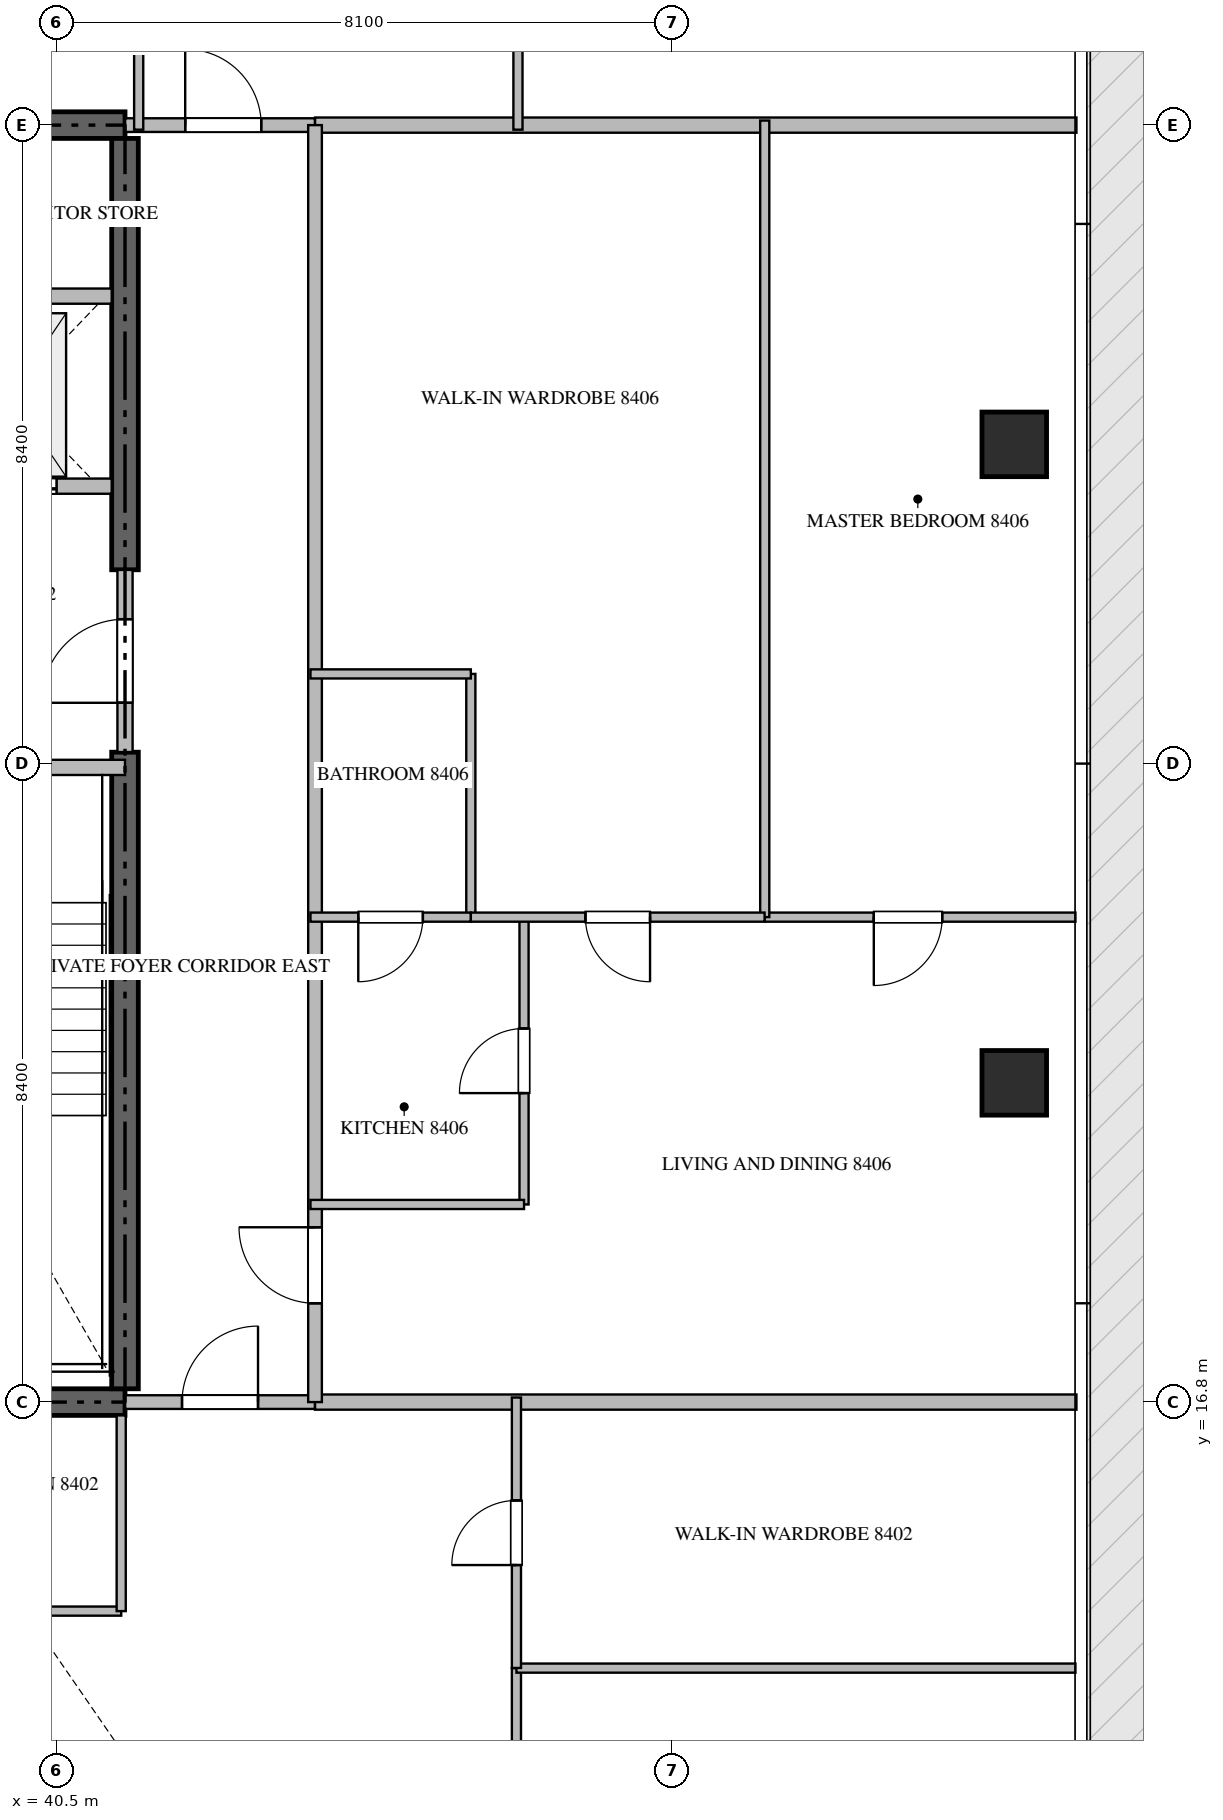
"""IFC4 building model, lengths in metres.
Left out: names, types, materials, properties, quantities, classifications, styles, units other than length and angle.
Written with IfcOpenShell. Run it as: python <this file> out.ifc"""

import sys

from ifc_helpers import new_model, si_unit, direction, frame, frame_2d, origin, origin_2d, place, context, subcontext, project, spatial, rectangle, extrude, source, transform, mapped, element, fill, save


model = new_model("IFC4")
c1 = context("Model", 3, precision=1e-05, world=origin(), true_north=direction((0.0, 1.0)))
c2 = subcontext(c1, "Body", "Model", "MODEL_VIEW")
j1 = project(units=[si_unit("LENGTHUNIT", "METRE"), si_unit("PLANEANGLEUNIT", "RADIAN")], contexts=[c1])
p1 = place(None, origin())
s1 = spatial("IfcSite", under=j1, at=p1, CompositionType="ELEMENT")
p2 = place(p1, origin())
s2 = spatial("IfcBuilding", under=s1, at=p2, CompositionType="ELEMENT")
p3 = place(p2, frame((0.0, 0.0, 338.0)))
s3 = spatial("IfcBuildingStorey", under=s2, at=p3, CompositionType="ELEMENT", Elevation=338.0)
for number, where, z_axis, x_axis in (
    (1, (23.4, 16.8, -0.44), (0.0, 0.0, 1.0), (1.0, 0.0, 0.0)),
    (2, (41.4, 33.6, -0.44), (0.0, 0.0, 1.0), (-1.0, 0.0, 0.0)),
):
    element("IfcWall", number, at=place(p3, frame(where, z_axis=z_axis, x_axis=x_axis)), inside=s3, PredefinedType="SHEAR", context=c2, shape_type="SweptSolid", body=[
        extrude(rectangle(XDim=18.0, YDim=0.35, at=frame_2d((9.0, 0.0))), origin(), (0.0, 0.0, 1.0), 4.228),
    ])
p4 = place(p3, frame((41.4, 16.975, -0.44), z_axis=(0.0, 0.0, 1.0), x_axis=(0.0, 1.0, 0.0)))
e3 = element("IfcWall", 3, at=p4, inside=s3, PredefinedType="SHEAR", context=c2, shape_type="SweptSolid", body=[
    extrude(rectangle(XDim=8.375, YDim=0.35, at=frame_2d((4.188, 0.0))), origin(), (0.0, 0.0, 1.0), 4.228),
])
p5 = place(p3, frame((41.4, 27.75, -0.44), z_axis=(0.0, 0.0, 1.0), x_axis=(0.0, 1.0, 0.0)))
e4 = element("IfcWall", 4, at=p5, inside=s3, PredefinedType="SHEAR", context=c2, shape_type="SweptSolid", body=[
    extrude(rectangle(XDim=5.675, YDim=0.35, at=frame_2d((2.837, 0.0))), origin(), (0.0, 0.0, 1.0), 4.228),
])
m1 = source(origin(), c2, "Body", "SweptSolid", [
    extrude(rectangle(XDim=0.85, YDim=0.85, at=origin_2d()), origin(), (0.0, 0.0, 1.0), 4.23),
])
for number, where, z_axis, x_axis in (
    (5, (53.1, 21.0, -0.44), (0.0, 0.0, 1.0), (1.0, 0.0, 0.0)),
    (6, (53.1, 29.4, -0.44), (0.0, 0.0, 1.0), (1.0, 0.0, 0.0)),
):
    element("IfcColumn", number, at=place(p3, frame(where, z_axis=z_axis, x_axis=x_axis)), inside=s3, PredefinedType="COLUMN", context=c2, shape_type="MappedRepresentation", body=[
        mapped(m1, transform((0.0, 0.0, 0.0), scale=1.0)),
    ])
p6 = place(p3, frame((36.95, 25.15, 0.0), z_axis=(0.0, 0.0, 1.0), x_axis=(1.0, 0.0, 0.0)))
e7 = element("IfcWall", 7, at=p6, inside=s3, PredefinedType="STANDARD", context=c2, shape_type="SweptSolid", body=[
    extrude(rectangle(XDim=4.45, YDim=0.2, at=frame_2d((2.225, 0.0))), origin(), (0.0, 0.0, 1.0), 3.79),
])
p7 = place(p6, frame((1.65, 0.0, 0.0)))
e8 = element("IfcOpeningElement", 8, at=p7, cuts=e7, PredefinedType="OPENING", context=c2, shape_type="SweptSolid", body=[
    extrude(rectangle(XDim=1.1, YDim=2.15, at=frame_2d((0.55, 1.075))), frame((0.0, 0.11, 0.0), z_axis=(0.0, -1.0, 0.0), x_axis=(1.0, 0.0, 0.0)), (0.0, 0.0, 1.0), 0.22),
])
p8 = place(p3, frame((38.75, 28.85, 0.0), z_axis=(0.0, 0.0, 1.0), x_axis=(1.0, 0.0, 0.0)))
e9 = element("IfcWall", 9, at=p8, inside=s3, PredefinedType="STANDARD", context=c2, shape_type="SweptSolid", body=[
    extrude(rectangle(XDim=2.475, YDim=0.2, at=frame_2d((1.238, 0.0))), origin(), (0.0, 0.0, 1.0), 3.79),
])
p9 = place(p8, frame((0.55, 0.0, 0.0)))
e10 = element("IfcOpeningElement", 10, at=p9, cuts=e9, PredefinedType="OPENING", context=c2, shape_type="SweptSolid", body=[
    extrude(rectangle(XDim=1.2, YDim=2.2, at=frame_2d((0.6, 1.1))), frame((0.0, 0.11, 0.0), z_axis=(0.0, -1.0, 0.0), x_axis=(1.0, 0.0, 0.0)), (0.0, 0.0, 1.0), 0.22),
])
p10 = place(p3, frame((38.75, 31.35, 0.0), z_axis=(0.0, 0.0, 1.0), x_axis=(1.0, 0.0, 0.0)))
e11 = element("IfcWall", 11, at=p10, inside=s3, PredefinedType="STANDARD", context=c2, shape_type="SweptSolid", body=[
    extrude(rectangle(XDim=2.475, YDim=0.2, at=frame_2d((1.238, 0.0))), origin(), (0.0, 0.0, 1.0), 3.79),
])
p11 = place(p3, frame((41.4, 25.352, 0.0), z_axis=(0.0, 0.0, 1.0), x_axis=(0.0, 1.0, 0.0)))
e12 = element("IfcWall", 12, at=p11, inside=s3, PredefinedType="STANDARD", context=c2, shape_type="SweptSolid", body=[
    extrude(rectangle(XDim=2.396, YDim=0.2, at=frame_2d((1.198, 0.0))), origin(), (0.0, 0.0, 1.0), 3.79),
])
p12 = place(p11, frame((0.648, 0.0, 0.0)))
e13 = element("IfcOpeningElement", 13, at=p12, cuts=e12, PredefinedType="OPENING", context=c2, shape_type="SweptSolid", body=[
    extrude(rectangle(XDim=1.1, YDim=2.15, at=frame_2d((0.55, 1.075))), frame((0.0, 0.11, 0.0), z_axis=(0.0, -1.0, 0.0), x_axis=(1.0, 0.0, 0.0)), (0.0, 0.0, 1.0), 0.22),
])
for number, where, z_axis, x_axis in (
    (14, (43.9, 16.8, 0.0), (0.0, 0.0, 1.0), (1.0, 0.0, 0.0)),
    (15, (43.9, 33.6, 0.0), (0.0, 0.0, 1.0), (1.0, 0.0, 0.0)),
):
    element("IfcWall", number, at=place(p3, frame(where, z_axis=z_axis, x_axis=x_axis)), inside=s3, PredefinedType="PARTITIONING", context=c2, shape_type="SweptSolid", body=[
        extrude(rectangle(XDim=10.018, YDim=0.2, at=frame_2d((5.009, 0.0))), origin(), (0.0, 0.0, 1.0), 3.79),
    ])
p13 = place(p3, frame((41.402, 16.8, 0.0), z_axis=(0.0, 0.0, 1.0), x_axis=(1.0, 0.0, 0.0)))
e16 = element("IfcWall", 16, at=p13, inside=s3, PredefinedType="PARTITIONING", context=c2, shape_type="SweptSolid", body=[
    extrude(rectangle(XDim=2.496, YDim=0.18, at=frame_2d((1.248, 0.0))), origin(), (0.0, 0.0, 1.0), 3.79),
])
p14 = place(p13, frame((0.748, 0.0, 0.0)))
e17 = element("IfcOpeningElement", 17, at=p14, cuts=e16, PredefinedType="OPENING", context=c2, shape_type="SweptSolid", body=[
    extrude(rectangle(XDim=1.0, YDim=2.15, at=frame_2d((0.5, 1.075))), frame((0.0, 0.1, 0.0), z_axis=(0.0, -1.0, 0.0), x_axis=(1.0, 0.0, 0.0)), (0.0, 0.0, 1.0), 0.2),
])
p15 = place(p3, frame((41.402, 33.6, 0.0), z_axis=(0.0, 0.0, 1.0), x_axis=(1.0, 0.0, 0.0)))
e18 = element("IfcWall", 18, at=p15, inside=s3, PredefinedType="PARTITIONING", context=c2, shape_type="SweptSolid", body=[
    extrude(rectangle(XDim=2.496, YDim=0.18, at=frame_2d((1.248, 0.0))), origin(), (0.0, 0.0, 1.0), 3.79),
])
p16 = place(p15, frame((0.79, 0.0, 0.0)))
e19 = element("IfcOpeningElement", 19, at=p16, cuts=e18, PredefinedType="OPENING", context=c2, shape_type="SweptSolid", body=[
    extrude(rectangle(XDim=1.0, YDim=2.15, at=frame_2d((0.5, 1.075))), frame((0.0, 0.1, 0.0), z_axis=(0.0, -1.0, 0.0), x_axis=(1.0, 0.0, 0.0)), (0.0, 0.0, 1.0), 0.2),
])
p17 = place(p3, frame((43.9, 16.8, 0.0), z_axis=(0.0, 0.0, 1.0), x_axis=(0.0, 1.0, 0.0)))
e20 = element("IfcWall", 20, at=p17, inside=s3, PredefinedType="PARTITIONING", context=c2, shape_type="SweptSolid", body=[
    extrude(rectangle(XDim=16.8, YDim=0.18, at=frame_2d((8.4, 0.0))), origin(), (0.0, 0.0, 1.0), 3.79),
])
p18 = place(p17, frame((1.3, 0.0, 0.0)))
e21 = element("IfcOpeningElement", 21, at=p18, cuts=e20, PredefinedType="OPENING", context=c2, shape_type="SweptSolid", body=[
    extrude(rectangle(XDim=1.0, YDim=2.15, at=frame_2d((0.5, 1.075))), frame((0.0, 0.1, 0.0), z_axis=(0.0, -1.0, 0.0), x_axis=(1.0, 0.0, 0.0)), (0.0, 0.0, 1.0), 0.2),
])
p19 = place(p3, frame((38.5, 14.05, 0.0), z_axis=(0.0, 0.0, 1.0), x_axis=(1.0, 0.0, 0.0)))
e22 = element("IfcWall", 22, at=p19, inside=s3, PredefinedType="PARTITIONING", context=c2, shape_type="SweptSolid", body=[
    extrude(rectangle(XDim=2.85, YDim=0.12, at=frame_2d((1.425, 0.0))), origin(), (0.0, 0.0, 1.0), 3.79),
])
p20 = place(p19, frame((1.0, 0.0, 0.0)))
e23 = element("IfcOpeningElement", 23, at=p20, cuts=e22, PredefinedType="OPENING", context=c2, shape_type="SweptSolid", body=[
    extrude(rectangle(XDim=0.85, YDim=2.1, at=frame_2d((0.425, 1.05))), frame((0.0, 0.07, 0.0), z_axis=(0.0, -1.0, 0.0), x_axis=(1.0, 0.0, 0.0)), (0.0, 0.0, 1.0), 0.14),
])
p21 = place(p3, frame((41.35, 14.05, 0.0), z_axis=(0.0, 0.0, 1.0), x_axis=(0.0, 1.0, 0.0)))
e24 = element("IfcWall", 24, at=p21, inside=s3, PredefinedType="PARTITIONING", context=c2, shape_type="SweptSolid", body=[
    extrude(rectangle(XDim=2.575, YDim=0.12, at=frame_2d((1.288, 0.0))), origin(), (0.0, 0.0, 1.0), 3.79),
])
p22 = place(p3, frame((46.55, 4.095, 0.0), z_axis=(0.0, 0.0, 1.0), x_axis=(0.0, 1.0, 0.0)))
e25 = element("IfcWall", 25, at=p22, inside=s3, PredefinedType="PARTITIONING", context=c2, shape_type="SweptSolid", body=[
    extrude(rectangle(XDim=9.205, YDim=0.12, at=frame_2d((4.603, 0.0))), origin(), (0.0, 0.0, 1.0), 3.79),
])
p23 = place(p22, frame((4.568, 0.0, 0.0)))
e26 = element("IfcOpeningElement", 26, at=p23, cuts=e25, PredefinedType="OPENING", context=c2, shape_type="SweptSolid", body=[
    extrude(rectangle(XDim=0.9, YDim=2.1, at=frame_2d((0.45, 1.05))), frame((0.0, 0.07, 0.0), z_axis=(0.0, -1.0, 0.0), x_axis=(1.0, 0.0, 0.0)), (0.0, 0.0, 1.0), 0.14),
])
p24 = place(p3, frame((46.55, 13.3, 0.0), z_axis=(0.0, 0.0, 1.0), x_axis=(1.0, 0.0, 0.0)))
e27 = element("IfcWall", 27, at=p24, inside=s3, PredefinedType="PARTITIONING", context=c2, shape_type="SweptSolid", body=[
    extrude(rectangle(XDim=7.355, YDim=0.12, at=frame_2d((3.677, 0.0))), origin(), (0.0, 0.0, 1.0), 3.79),
])
p25 = place(p3, frame((46.55, 13.302, 0.0), z_axis=(0.0, 0.0, 1.0), x_axis=(0.0, 1.0, 0.0)))
e28 = element("IfcWall", 28, at=p25, inside=s3, PredefinedType="PARTITIONING", context=c2, shape_type="SweptSolid", body=[
    extrude(rectangle(XDim=3.558, YDim=0.12, at=frame_2d((1.779, 0.0))), origin(), (0.0, 0.0, 1.0), 3.79),
])
p26 = place(p25, frame((1.354, 0.0, 0.0)))
e29 = element("IfcOpeningElement", 29, at=p26, cuts=e28, PredefinedType="OPENING", context=c2, shape_type="SweptSolid", body=[
    extrude(rectangle(XDim=0.85, YDim=2.1, at=frame_2d((0.425, 1.05))), frame((0.0, 0.07, 0.0), z_axis=(0.0, -1.0, 0.0), x_axis=(1.0, 0.0, 0.0)), (0.0, 0.0, 1.0), 0.14),
])
p27 = place(p3, frame((41.58, 36.35, 0.0), z_axis=(0.0, 0.0, 1.0), x_axis=(0.0, -1.0, 0.0)))
e30 = element("IfcWall", 30, at=p27, inside=s3, PredefinedType="PARTITIONING", context=c2, shape_type="SweptSolid", body=[
    extrude(rectangle(XDim=2.81, YDim=0.12, at=frame_2d((1.405, 0.0))), origin(), (0.0, 0.0, 1.0), 3.79),
])
p28 = place(p3, frame((46.57, 37.074, 0.0), z_axis=(0.0, 0.0, 1.0), x_axis=(0.0, -1.0, 0.0)))
e31 = element("IfcWall", 31, at=p28, inside=s3, PredefinedType="PARTITIONING", context=c2, shape_type="SweptSolid", body=[
    extrude(rectangle(XDim=3.534, YDim=0.12, at=frame_2d((1.767, 0.0))), origin(), (0.0, 0.0, 1.0), 3.79),
])
p29 = place(p28, frame((1.342, 0.0, 0.0)))
e32 = element("IfcOpeningElement", 32, at=p29, cuts=e31, PredefinedType="OPENING", context=c2, shape_type="SweptSolid", body=[
    extrude(rectangle(XDim=0.85, YDim=2.1, at=frame_2d((0.425, 1.05))), frame((0.0, 0.07, 0.0), z_axis=(0.0, -1.0, 0.0), x_axis=(1.0, 0.0, 0.0)), (0.0, 0.0, 1.0), 0.14),
])
p30 = place(p3, frame((46.65, 19.4, 0.0), z_axis=(0.0, 0.0, 1.0), x_axis=(0.0, 1.0, 0.0)))
e33 = element("IfcWall", 33, at=p30, inside=s3, PredefinedType="PARTITIONING", context=c2, shape_type="SweptSolid", body=[
    extrude(rectangle(XDim=3.78, YDim=0.12, at=frame_2d((1.89, 0.0))), origin(), (0.0, 0.0, 1.0), 3.79),
])
p31 = place(p30, frame((1.465, 0.0, 0.0)))
e34 = element("IfcOpeningElement", 34, at=p31, cuts=e33, PredefinedType="OPENING", context=c2, shape_type="SweptSolid", body=[
    extrude(rectangle(XDim=0.85, YDim=2.1, at=frame_2d((0.425, 1.05))), frame((0.0, 0.07, 0.0), z_axis=(0.0, -1.0, 0.0), x_axis=(1.0, 0.0, 0.0)), (0.0, 0.0, 1.0), 0.14),
])
p32 = place(p3, frame((46.65, 19.4, 0.0), z_axis=(0.0, 0.0, 1.0), x_axis=(-1.0, 0.0, 0.0)))
e35 = element("IfcWall", 35, at=p32, inside=s3, PredefinedType="PARTITIONING", context=c2, shape_type="SweptSolid", body=[
    extrude(rectangle(XDim=2.81, YDim=0.12, at=frame_2d((1.405, 0.0))), origin(), (0.0, 0.0, 1.0), 3.79),
])
p33 = place(p3, frame((53.905, 23.18, 0.0), z_axis=(0.0, 0.0, 1.0), x_axis=(-1.0, 0.0, 0.0)))
e36 = element("IfcWall", 36, at=p33, inside=s3, PredefinedType="PARTITIONING", context=c2, shape_type="SweptSolid", body=[
    extrude(rectangle(XDim=4.088, YDim=0.12, at=frame_2d((2.044, 0.0))), origin(), (0.0, 0.0, 1.0), 3.79),
])
p34 = place(p33, frame((1.753, 0.0, 0.0)))
e37 = element("IfcOpeningElement", 37, at=p34, cuts=e36, PredefinedType="OPENING", context=c2, shape_type="SweptSolid", body=[
    extrude(rectangle(XDim=0.9, YDim=2.1, at=frame_2d((0.45, 1.05))), frame((0.0, 0.07, 0.0), z_axis=(0.0, -1.0, 0.0), x_axis=(1.0, 0.0, 0.0)), (0.0, 0.0, 1.0), 0.14),
])
p35 = place(p3, frame((49.817, 23.18, 0.0), z_axis=(0.0, 0.0, 1.0), x_axis=(0.0, 1.0, 0.0)))
e38 = element("IfcWall", 38, at=p35, inside=s3, PredefinedType="PARTITIONING", context=c2, shape_type="SweptSolid", body=[
    extrude(rectangle(XDim=10.48, YDim=0.12, at=frame_2d((5.24, 0.0))), origin(), (0.0, 0.0, 1.0), 3.79),
])
p36 = place(p3, frame((45.95, 23.18, 0.0), z_axis=(0.0, 0.0, 1.0), x_axis=(0.0, 1.0, 0.0)))
e39 = element("IfcWall", 39, at=p36, inside=s3, PredefinedType="PARTITIONING", context=c2, shape_type="SweptSolid", body=[
    extrude(rectangle(XDim=3.2, YDim=0.12, at=frame_2d((1.6, 0.0))), origin(), (0.0, 0.0, 1.0), 3.79),
])
p37 = place(p3, frame((45.95, 26.38, 0.0), z_axis=(0.0, 0.0, 1.0), x_axis=(-1.0, 0.0, 0.0)))
e40 = element("IfcWall", 40, at=p37, inside=s3, PredefinedType="PARTITIONING", context=c2, shape_type="SweptSolid", body=[
    extrude(rectangle(XDim=2.11, YDim=0.12, at=frame_2d((1.055, 0.0))), origin(), (0.0, 0.0, 1.0), 3.79),
])
p38 = place(p3, frame((49.815, 23.18, 0.0), z_axis=(0.0, 0.0, 1.0), x_axis=(-1.0, 0.0, 0.0)))
e41 = element("IfcWall", 41, at=p38, inside=s3, PredefinedType="PARTITIONING", context=c2, shape_type="SweptSolid", body=[
    extrude(rectangle(XDim=3.865, YDim=0.12, at=frame_2d((1.933, 0.0))), origin(), (0.0, 0.0, 1.0), 3.79),
])
p39 = place(p38, frame((1.507, 0.0, 0.0)))
e42 = element("IfcOpeningElement", 42, at=p39, cuts=e41, PredefinedType="OPENING", context=c2, shape_type="SweptSolid", body=[
    extrude(rectangle(XDim=0.85, YDim=2.1, at=frame_2d((0.425, 1.05))), frame((0.0, 0.07, 0.0), z_axis=(0.0, -1.0, 0.0), x_axis=(1.0, 0.0, 0.0)), (0.0, 0.0, 1.0), 0.14),
])
p40 = place(p3, frame((45.948, 23.18, 0.0), z_axis=(0.0, 0.0, 1.0), x_axis=(-1.0, 0.0, 0.0)))
e43 = element("IfcWall", 43, at=p40, inside=s3, PredefinedType="PARTITIONING", context=c2, shape_type="SweptSolid", body=[
    extrude(rectangle(XDim=2.108, YDim=0.12, at=frame_2d((1.054, 0.0))), origin(), (0.0, 0.0, 1.0), 3.79),
])
p41 = place(p40, frame((0.629, 0.0, 0.0)))
e44 = element("IfcOpeningElement", 44, at=p41, cuts=e43, PredefinedType="OPENING", context=c2, shape_type="SweptSolid", body=[
    extrude(rectangle(XDim=0.85, YDim=2.1, at=frame_2d((0.425, 1.05))), frame((0.0, 0.07, 0.0), z_axis=(0.0, -1.0, 0.0), x_axis=(1.0, 0.0, 0.0)), (0.0, 0.0, 1.0), 0.14),
])
m2 = source(origin(), c2, "Body", "SweptSolid", [
    extrude(rectangle(XDim=1.2, YDim=2.2, at=frame_2d((0.6, 1.1))), frame((0.0, 0.025, 0.0), z_axis=(0.0, -1.0, 0.0), x_axis=(1.0, 0.0, 0.0)), (0.0, 0.0, 1.0), 0.05),
])
p42 = place(p9, origin())
e45 = element("IfcDoor", 45, at=p42, inside=s3, OperationType="DOUBLE_DOOR_SLIDING", PredefinedType="DOOR", context=c2, shape_type="MappedRepresentation", body=[
    mapped(m2, transform((0.0, 0.0, 0.0), scale=1.0)),
])
fill(e10, e45)
m3 = source(origin(), c2, "Body", "SweptSolid", [
    extrude(rectangle(XDim=1.1, YDim=2.15, at=frame_2d((0.55, 1.075))), frame((0.0, 0.025, 0.0), z_axis=(0.0, -1.0, 0.0), x_axis=(1.0, 0.0, 0.0)), (0.0, 0.0, 1.0), 0.05),
])
p43 = place(p12, origin())
e46 = element("IfcDoor", 46, at=p43, inside=s3, OperationType="SINGLE_SWING_LEFT", PredefinedType="DOOR", context=c2, shape_type="MappedRepresentation", body=[
    mapped(m3, transform((0.0, 0.0, 0.0), scale=1.0)),
])
fill(e13, e46)
m4 = source(origin(), c2, "Body", "SweptSolid", [
    extrude(rectangle(XDim=1.0, YDim=2.15, at=frame_2d((0.5, 1.075))), frame((0.0, 0.025, 0.0), z_axis=(0.0, -1.0, 0.0), x_axis=(1.0, 0.0, 0.0)), (0.0, 0.0, 1.0), 0.05),
])
p44 = place(p14, origin())
e47 = element("IfcDoor", 47, at=p44, inside=s3, OperationType="SINGLE_SWING_RIGHT", PredefinedType="DOOR", context=c2, shape_type="MappedRepresentation", body=[
    mapped(m4, transform((0.0, 0.0, 0.0), scale=1.0)),
])
fill(e17, e47)
p45 = place(p16, origin())
e48 = element("IfcDoor", 48, at=p45, inside=s3, OperationType="SINGLE_SWING_LEFT", PredefinedType="DOOR", context=c2, shape_type="MappedRepresentation", body=[
    mapped(m4, transform((0.0, 0.0, 0.0), scale=1.0)),
])
fill(e19, e48)
p46 = place(p18, origin())
e49 = element("IfcDoor", 49, at=p46, inside=s3, OperationType="SINGLE_SWING_RIGHT", PredefinedType="DOOR", context=c2, shape_type="MappedRepresentation", body=[
    mapped(m4, transform((0.0, 0.0, 0.0), scale=1.0)),
])
fill(e21, e49)
m5 = source(origin(), c2, "Body", "SweptSolid", [
    extrude(rectangle(XDim=0.85, YDim=2.1, at=frame_2d((0.425, 1.05))), frame((0.0, 0.025, 0.0), z_axis=(0.0, -1.0, 0.0), x_axis=(1.0, 0.0, 0.0)), (0.0, 0.0, 1.0), 0.05),
])
p47 = place(p26, origin())
e50 = element("IfcDoor", 50, at=p47, inside=s3, OperationType="SINGLE_SWING_LEFT", PredefinedType="DOOR", context=c2, shape_type="MappedRepresentation", body=[
    mapped(m5, transform((0.0, 0.0, 0.0), scale=1.0)),
])
fill(e29, e50)
p48 = place(p31, origin())
e51 = element("IfcDoor", 51, at=p48, inside=s3, OperationType="SINGLE_SWING_LEFT", PredefinedType="DOOR", context=c2, shape_type="MappedRepresentation", body=[
    mapped(m5, transform((0.0, 0.0, 0.0), scale=1.0)),
])
fill(e34, e51)
m6 = source(origin(), c2, "Body", "SweptSolid", [
    extrude(rectangle(XDim=0.9, YDim=2.1, at=frame_2d((0.45, 1.05))), frame((0.0, 0.025, 0.0), z_axis=(0.0, -1.0, 0.0), x_axis=(1.0, 0.0, 0.0)), (0.0, 0.0, 1.0), 0.05),
])
p49 = place(p34, origin())
e52 = element("IfcDoor", 52, at=p49, inside=s3, OperationType="SINGLE_SWING_RIGHT", PredefinedType="DOOR", context=c2, shape_type="MappedRepresentation", body=[
    mapped(m6, transform((0.0, 0.0, 0.0), scale=1.0)),
])
fill(e37, e52)
p50 = place(p39, origin())
e53 = element("IfcDoor", 53, at=p50, inside=s3, OperationType="SINGLE_SWING_LEFT", PredefinedType="DOOR", context=c2, shape_type="MappedRepresentation", body=[
    mapped(m5, transform((0.0, 0.0, 0.0), scale=1.0)),
])
fill(e42, e53)
p51 = place(p41, origin())
e54 = element("IfcDoor", 54, at=p51, inside=s3, OperationType="SINGLE_SWING_RIGHT", PredefinedType="DOOR", context=c2, shape_type="MappedRepresentation", body=[
    mapped(m5, transform((0.0, 0.0, 0.0), scale=1.0)),
])
fill(e44, e54)
save(model, sys.argv[1])
